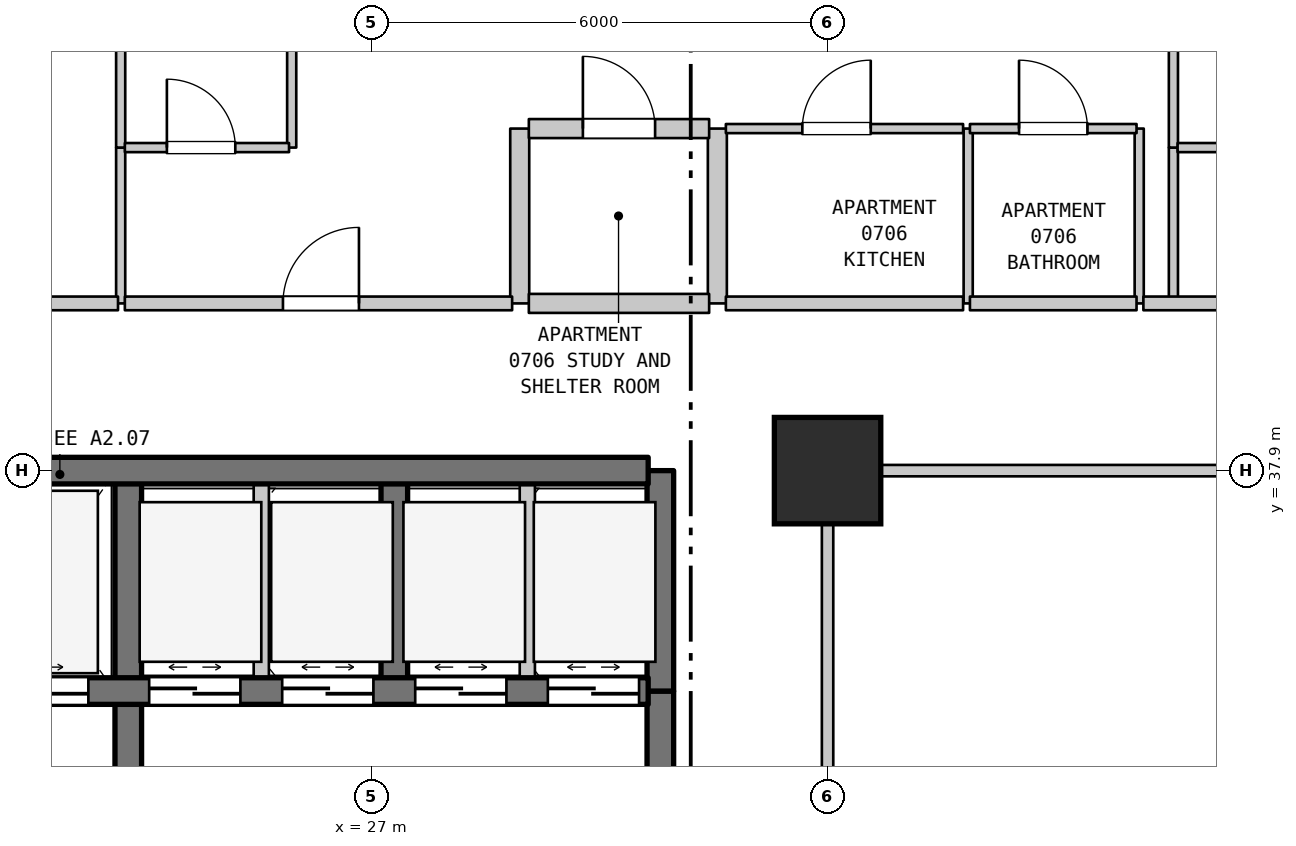
"""IFC4 building model, lengths in metres.
Left out: names, types, materials, properties, quantities, classifications, styles, units other than length and angle.
Written with IfcOpenShell. Run it as: python <this file> out.ifc"""

import sys

from ifc_helpers import new_model, si_unit, direction, frame, frame_2d, origin, origin_2d, place, context, subcontext, project, spatial, rectangle, extrude, element, fill, save


model = new_model("IFC4")
c1 = context("Model", 3, precision=1e-05, world=origin(), true_north=direction((0.0, 1.0)))
c2 = subcontext(c1, "Body", "Model", "MODEL_VIEW")
j1 = project(units=[si_unit("LENGTHUNIT", "METRE"), si_unit("PLANEANGLEUNIT", "RADIAN")], contexts=[c1])
p1 = place(None, origin())
s1 = spatial("IfcSite", under=j1, at=p1, CompositionType="ELEMENT")
p2 = place(p1, origin())
s2 = spatial("IfcBuilding", under=s1, at=p2, CompositionType="ELEMENT")
p3 = place(p2, frame((0.0, 0.0, 35.1)))
s3 = spatial("IfcBuildingStorey", under=s2, at=p3, CompositionType="ELEMENT", Elevation=35.1)
p4 = place(p3, frame((33.0, 37.9, 0.0), z_axis=(0.0, 0.0, 1.0), x_axis=(1.0, 0.0, 0.0)))
e1 = element("IfcColumn", 1, at=p4, inside=s3, PredefinedType="COLUMN", context=c2, shape_type="SweptSolid", body=[
    extrude(rectangle(XDim=1.4, YDim=1.4, at=origin_2d()), origin(), (0.0, 0.0, 1.0), 3.7),
])
p5 = place(p3, frame((23.7, 40.1, 0.0), z_axis=(0.0, 0.0, 1.0), x_axis=(0.0, 1.0, 0.0)))
e2 = element("IfcWall", 2, at=p5, inside=s3, PredefinedType="PARTITIONING", context=c2, shape_type="SweptSolid", body=[
    extrude(rectangle(XDim=2.05, YDim=0.12, at=frame_2d((1.025, 0.0))), origin(), (0.0, 0.0, 1.0), 3.385),
])
p6 = place(p3, frame((23.7, 42.15, 0.0), z_axis=(0.0, 0.0, 1.0), x_axis=(0.0, 1.0, 0.0)))
e3 = element("IfcWall", 3, at=p6, inside=s3, PredefinedType="PARTITIONING", context=c2, shape_type="SweptSolid", body=[
    extrude(rectangle(XDim=11.74, YDim=0.12, at=frame_2d((5.87, 0.0))), origin(), (0.0, 0.0, 1.0), 3.385),
])
p7 = place(p3, frame((23.8, 31.5, 0.0), z_axis=(0.0, 0.0, 1.0), x_axis=(0.0, 1.0, 0.0)))
e4 = element("IfcWall", 4, at=p7, inside=s3, PredefinedType="SHEAR", context=c2, shape_type="SweptSolid", body=[
    extrude(rectangle(XDim=3.5, YDim=0.35, at=frame_2d((1.75, 0.0))), origin(), (0.0, 0.0, 1.0), 3.385),
])
p8 = place(p7, frame((1.127, 0.0, 0.0)))
e5 = element("IfcOpeningElement", 5, at=p8, cuts=e4, PredefinedType="OPENING", context=c2, shape_type="SweptSolid", body=[
    extrude(rectangle(XDim=1.1, YDim=2.15, at=frame_2d((0.55, 1.075))), frame((0.0, 0.185, 0.0), z_axis=(0.0, -1.0, 0.0), x_axis=(1.0, 0.0, 0.0)), (0.0, 0.0, 1.0), 0.37),
])
p9 = place(p3, frame((23.8, 35.0, 0.0), z_axis=(0.0, 0.0, 1.0), x_axis=(0.0, 1.0, 0.0)))
e6 = element("IfcWall", 6, at=p9, inside=s3, PredefinedType="SHEAR", context=c2, shape_type="SweptSolid", body=[
    extrude(rectangle(XDim=2.9, YDim=0.35, at=frame_2d((1.45, 0.0))), origin(), (0.0, 0.0, 1.0), 3.385),
])
p10 = place(p3, frame((25.55, 35.0, 0.0), z_axis=(0.0, 0.0, 1.0), x_axis=(0.0, 1.0, 0.0)))
e7 = element("IfcWall", 7, at=p10, inside=s3, PredefinedType="STANDARD", context=c2, shape_type="SweptSolid", body=[
    extrude(rectangle(XDim=2.9, YDim=0.2, at=frame_2d((1.45, 0.0))), origin(), (0.0, 0.0, 1.0), 3.385),
])
p11 = place(p3, frame((25.95, 42.15, 0.0), z_axis=(0.0, 0.0, 1.0), x_axis=(0.0, 1.0, 0.0)))
e8 = element("IfcWall", 8, at=p11, inside=s3, PredefinedType="PARTITIONING", context=c2, shape_type="SweptSolid", body=[
    extrude(rectangle(XDim=11.74, YDim=0.12, at=frame_2d((5.87, 0.0))), origin(), (0.0, 0.0, 1.0), 3.385),
])
p12 = place(p3, frame((27.3, 35.0, 0.0), z_axis=(0.0, 0.0, 1.0), x_axis=(0.0, 1.0, 0.0)))
e9 = element("IfcWall", 9, at=p12, inside=s3, PredefinedType="SHEAR", context=c2, shape_type="SweptSolid", body=[
    extrude(rectangle(XDim=2.9, YDim=0.35, at=frame_2d((1.45, 0.0))), origin(), (0.0, 0.0, 1.0), 3.385),
])
p13 = place(p3, frame((28.95, 40.1, 0.0), z_axis=(0.0, 0.0, 1.0), x_axis=(0.0, 1.0, 0.0)))
e10 = element("IfcWall", 10, at=p13, inside=s3, PredefinedType="STANDARD", context=c2, shape_type="SweptSolid", body=[
    extrude(rectangle(XDim=2.3, YDim=0.25, at=frame_2d((1.15, 0.0))), origin(), (0.0, 0.0, 1.0), 3.385),
])
p14 = place(p3, frame((29.05, 35.0, 0.0), z_axis=(0.0, 0.0, 1.0), x_axis=(0.0, 1.0, 0.0)))
e11 = element("IfcWall", 11, at=p14, inside=s3, PredefinedType="STANDARD", context=c2, shape_type="SweptSolid", body=[
    extrude(rectangle(XDim=2.9, YDim=0.2, at=frame_2d((1.45, 0.0))), origin(), (0.0, 0.0, 1.0), 3.385),
])
p15 = place(p3, frame((30.8, 31.5, 0.0), z_axis=(0.0, 0.0, 1.0), x_axis=(0.0, 1.0, 0.0)))
e12 = element("IfcWall", 12, at=p15, inside=s3, PredefinedType="SHEAR", context=c2, shape_type="SweptSolid", body=[
    extrude(rectangle(XDim=3.5, YDim=0.35, at=frame_2d((1.75, 0.0))), origin(), (0.0, 0.0, 1.0), 3.385),
])
p16 = place(p15, frame((1.15, 0.0, 0.0)))
e13 = element("IfcOpeningElement", 13, at=p16, cuts=e12, PredefinedType="OPENING", context=c2, shape_type="SweptSolid", body=[
    extrude(rectangle(XDim=1.2, YDim=2.2, at=frame_2d((0.6, 1.1))), frame((0.0, 0.185, 0.0), z_axis=(0.0, -1.0, 0.0), x_axis=(1.0, 0.0, 0.0)), (0.0, 0.0, 1.0), 0.37),
])
p17 = place(p3, frame((30.8, 35.0, 0.0), z_axis=(0.0, 0.0, 1.0), x_axis=(0.0, 1.0, 0.0)))
e14 = element("IfcWall", 14, at=p17, inside=s3, PredefinedType="SHEAR", context=c2, shape_type="SweptSolid", body=[
    extrude(rectangle(XDim=2.9, YDim=0.35, at=frame_2d((1.45, 0.0))), origin(), (0.0, 0.0, 1.0), 3.385),
])
p18 = place(p3, frame((31.55, 40.1, 0.0), z_axis=(0.0, 0.0, 1.0), x_axis=(0.0, 1.0, 0.0)))
e15 = element("IfcWall", 15, at=p18, inside=s3, PredefinedType="STANDARD", context=c2, shape_type="SweptSolid", body=[
    extrude(rectangle(XDim=2.3, YDim=0.25, at=frame_2d((1.15, 0.0))), origin(), (0.0, 0.0, 1.0), 3.385),
])
p19 = place(p3, frame((33.0, 27.91, 0.0), z_axis=(0.0, 0.0, 1.0), x_axis=(0.0, 1.0, 0.0)))
e16 = element("IfcWall", 16, at=p19, inside=s3, PredefinedType="STANDARD", context=c2, shape_type="SweptSolid", body=[
    extrude(rectangle(XDim=9.98, YDim=0.15, at=frame_2d((4.99, 0.0))), origin(), (0.0, 0.0, 1.0), 2.885),
])
for number, where, z_axis, x_axis in (
    (17, (34.85, 40.1, 0.0), (0.0, 0.0, 1.0), (0.0, 1.0, 0.0)),
    (18, (37.1, 40.1, 0.0), (0.0, 0.0, 1.0), (0.0, 1.0, 0.0)),
):
    element("IfcWall", number, at=place(p3, frame(where, z_axis=z_axis, x_axis=x_axis)), inside=s3, PredefinedType="PARTITIONING", context=c2, shape_type="SweptSolid", body=[
        extrude(rectangle(XDim=2.3, YDim=0.12, at=frame_2d((1.15, 0.0))), origin(), (0.0, 0.0, 1.0), 3.385),
    ])
p20 = place(p3, frame((37.55, 40.1, 0.0), z_axis=(0.0, 0.0, 1.0), x_axis=(0.0, 1.0, 0.0)))
e19 = element("IfcWall", 19, at=p20, inside=s3, PredefinedType="PARTITIONING", context=c2, shape_type="SweptSolid", body=[
    extrude(rectangle(XDim=2.05, YDim=0.12, at=frame_2d((1.025, 0.0))), origin(), (0.0, 0.0, 1.0), 3.385),
])
p21 = place(p3, frame((37.55, 42.15, 0.0), z_axis=(0.0, 0.0, 1.0), x_axis=(0.0, 1.0, 0.0)))
e20 = element("IfcWall", 20, at=p21, inside=s3, PredefinedType="PARTITIONING", context=c2, shape_type="SweptSolid", body=[
    extrude(rectangle(XDim=3.3, YDim=0.12, at=frame_2d((1.65, 0.0))), origin(), (0.0, 0.0, 1.0), 3.385),
])
p22 = place(p3, frame((19.16, 35.0, 0.0), z_axis=(0.0, 0.0, 1.0), x_axis=(1.0, 0.0, 0.0)))
e21 = element("IfcWall", 21, at=p22, inside=s3, PredefinedType="SHEAR", context=c2, shape_type="SweptSolid", body=[
    extrude(rectangle(XDim=11.48, YDim=0.35, at=frame_2d((5.74, 0.0))), origin(), (0.0, 0.0, 1.0), 3.385),
])
p23 = place(p22, frame((0.365, 0.0, 0.0)))
e22 = element("IfcOpeningElement", 22, at=p23, cuts=e21, PredefinedType="OPENING", context=c2, shape_type="SweptSolid", body=[
    extrude(rectangle(XDim=1.35, YDim=2.2, at=frame_2d((0.675, 1.1))), frame((0.0, 0.185, 0.0), z_axis=(0.0, -1.0, 0.0), x_axis=(1.0, 0.0, 0.0)), (0.0, 0.0, 1.0), 0.37),
])
p24 = place(p22, frame((2.765, 0.0, 0.0)))
e23 = element("IfcOpeningElement", 23, at=p24, cuts=e21, PredefinedType="OPENING", context=c2, shape_type="SweptSolid", body=[
    extrude(rectangle(XDim=1.35, YDim=2.2, at=frame_2d((0.675, 1.1))), frame((0.0, 0.185, 0.0), z_axis=(0.0, -1.0, 0.0), x_axis=(1.0, 0.0, 0.0)), (0.0, 0.0, 1.0), 0.37),
])
p25 = place(p22, frame((4.915, 0.0, 0.0)))
e24 = element("IfcOpeningElement", 24, at=p25, cuts=e21, PredefinedType="OPENING", context=c2, shape_type="SweptSolid", body=[
    extrude(rectangle(XDim=1.2, YDim=2.2, at=frame_2d((0.6, 1.1))), frame((0.0, 0.185, 0.0), z_axis=(0.0, -1.0, 0.0), x_axis=(1.0, 0.0, 0.0)), (0.0, 0.0, 1.0), 0.37),
])
p26 = place(p22, frame((6.665, 0.0, 0.0)))
e25 = element("IfcOpeningElement", 25, at=p26, cuts=e21, PredefinedType="OPENING", context=c2, shape_type="SweptSolid", body=[
    extrude(rectangle(XDim=1.2, YDim=2.2, at=frame_2d((0.6, 1.1))), frame((0.0, 0.185, 0.0), z_axis=(0.0, -1.0, 0.0), x_axis=(1.0, 0.0, 0.0)), (0.0, 0.0, 1.0), 0.37),
])
p27 = place(p22, frame((8.415, 0.0, 0.0)))
e26 = element("IfcOpeningElement", 26, at=p27, cuts=e21, PredefinedType="OPENING", context=c2, shape_type="SweptSolid", body=[
    extrude(rectangle(XDim=1.2, YDim=2.2, at=frame_2d((0.6, 1.1))), frame((0.0, 0.185, 0.0), z_axis=(0.0, -1.0, 0.0), x_axis=(1.0, 0.0, 0.0)), (0.0, 0.0, 1.0), 0.37),
])
p28 = place(p22, frame((10.16, 0.0, 0.0)))
e27 = element("IfcOpeningElement", 27, at=p28, cuts=e21, PredefinedType="OPENING", context=c2, shape_type="SweptSolid", body=[
    extrude(rectangle(XDim=1.2, YDim=2.2, at=frame_2d((0.6, 1.1))), frame((0.0, 0.185, 0.0), z_axis=(0.0, -1.0, 0.0), x_axis=(1.0, 0.0, 0.0)), (0.0, 0.0, 1.0), 0.37),
])
p29 = place(p3, frame((19.16, 37.9, 0.0), z_axis=(0.0, 0.0, 1.0), x_axis=(1.0, 0.0, 0.0)))
e28 = element("IfcWall", 28, at=p29, inside=s3, PredefinedType="SHEAR", context=c2, shape_type="SweptSolid", body=[
    extrude(rectangle(XDim=11.48, YDim=0.35, at=frame_2d((5.74, 0.0))), origin(), (0.0, 0.0, 1.0), 3.385),
])
p30 = place(p3, frame((33.07, 37.9, 0.0), z_axis=(0.0, 0.0, 1.0), x_axis=(1.0, 0.0, 0.0)))
e29 = element("IfcWall", 29, at=p30, inside=s3, PredefinedType="STANDARD", context=c2, shape_type="SweptSolid", body=[
    extrude(rectangle(XDim=26.935, YDim=0.15, at=frame_2d((13.467, 0.0))), origin(), (0.0, 0.0, 1.0), 3.385),
])
p31 = place(p3, frame((21.255, 40.1, 0.0), z_axis=(0.0, 0.0, 1.0), x_axis=(1.0, 0.0, 0.0)))
e30 = element("IfcWall", 30, at=p31, inside=s3, PredefinedType="STANDARD", context=c2, shape_type="SweptSolid", body=[
    extrude(rectangle(XDim=2.41, YDim=0.18, at=frame_2d((1.205, 0.0))), origin(), (0.0, 0.0, 1.0), 3.385),
])
p32 = place(p3, frame((23.755, 40.1, 0.0), z_axis=(0.0, 0.0, 1.0), x_axis=(1.0, 0.0, 0.0)))
e31 = element("IfcWall", 31, at=p32, inside=s3, PredefinedType="STANDARD", context=c2, shape_type="SweptSolid", body=[
    extrude(rectangle(XDim=5.095, YDim=0.18, at=frame_2d((2.548, 0.0))), origin(), (0.0, 0.0, 1.0), 3.385),
])
p33 = place(p32, frame((2.08, 0.0, 0.0)))
e32 = element("IfcOpeningElement", 32, at=p33, cuts=e31, PredefinedType="OPENING", context=c2, shape_type="SweptSolid", body=[
    extrude(rectangle(XDim=1.0, YDim=2.15, at=frame_2d((0.5, 1.075))), frame((0.0, 0.1, 0.0), z_axis=(0.0, -1.0, 0.0), x_axis=(1.0, 0.0, 0.0)), (0.0, 0.0, 1.0), 0.2),
])
p34 = place(p3, frame((29.07, 40.1, 0.0), z_axis=(0.0, 0.0, 1.0), x_axis=(1.0, 0.0, 0.0)))
e33 = element("IfcWall", 33, at=p34, inside=s3, PredefinedType="STANDARD", context=c2, shape_type="SweptSolid", body=[
    extrude(rectangle(XDim=2.372, YDim=0.25, at=frame_2d((1.186, 0.0))), origin(), (0.0, 0.0, 1.0), 3.385),
])
p35 = place(p3, frame((31.662, 40.1, 0.0), z_axis=(0.0, 0.0, 1.0), x_axis=(1.0, 0.0, 0.0)))
e34 = element("IfcWall", 34, at=p35, inside=s3, PredefinedType="STANDARD", context=c2, shape_type="SweptSolid", body=[
    extrude(rectangle(XDim=3.121, YDim=0.18, at=frame_2d((1.561, 0.0))), origin(), (0.0, 0.0, 1.0), 3.385),
])
p36 = place(p3, frame((34.873, 40.1, 0.0), z_axis=(0.0, 0.0, 1.0), x_axis=(1.0, 0.0, 0.0)))
e35 = element("IfcWall", 35, at=p36, inside=s3, PredefinedType="STANDARD", context=c2, shape_type="SweptSolid", body=[
    extrude(rectangle(XDim=2.192, YDim=0.18, at=frame_2d((1.096, 0.0))), origin(), (0.0, 0.0, 1.0), 3.385),
])
p37 = place(p3, frame((37.155, 40.1, 0.0), z_axis=(0.0, 0.0, 1.0), x_axis=(1.0, 0.0, 0.0)))
e36 = element("IfcWall", 36, at=p37, inside=s3, PredefinedType="STANDARD", context=c2, shape_type="SweptSolid", body=[
    extrude(rectangle(XDim=5.3, YDim=0.18, at=frame_2d((2.65, 0.0))), origin(), (0.0, 0.0, 1.0), 3.385),
])
p38 = place(p37, frame((2.15, 0.0, 0.0)))
e37 = element("IfcOpeningElement", 37, at=p38, cuts=e36, PredefinedType="OPENING", context=c2, shape_type="SweptSolid", body=[
    extrude(rectangle(XDim=1.0, YDim=2.15, at=frame_2d((0.5, 1.075))), frame((0.0, 0.1, 0.0), z_axis=(0.0, -1.0, 0.0), x_axis=(1.0, 0.0, 0.0)), (0.0, 0.0, 1.0), 0.2),
])
p39 = place(p3, frame((23.755, 42.15, 0.0), z_axis=(0.0, 0.0, 1.0), x_axis=(1.0, 0.0, 0.0)))
e38 = element("IfcWall", 38, at=p39, inside=s3, PredefinedType="PARTITIONING", context=c2, shape_type="SweptSolid", body=[
    extrude(rectangle(XDim=2.16, YDim=0.12, at=frame_2d((1.08, 0.0))), origin(), (0.0, 0.0, 1.0), 3.385),
])
p40 = place(p39, frame((0.553, 0.0, 0.0)))
e39 = element("IfcOpeningElement", 39, at=p40, cuts=e38, PredefinedType="OPENING", context=c2, shape_type="SweptSolid", body=[
    extrude(rectangle(XDim=0.9, YDim=2.15, at=frame_2d((0.45, 1.075))), frame((0.0, 0.07, 0.0), z_axis=(0.0, -1.0, 0.0), x_axis=(1.0, 0.0, 0.0)), (0.0, 0.0, 1.0), 0.14),
])
p41 = place(p3, frame((37.605, 42.15, 0.0), z_axis=(0.0, 0.0, 1.0), x_axis=(1.0, 0.0, 0.0)))
e40 = element("IfcWall", 40, at=p41, inside=s3, PredefinedType="PARTITIONING", context=c2, shape_type="SweptSolid", body=[
    extrude(rectangle(XDim=2.16, YDim=0.12, at=frame_2d((1.08, 0.0))), origin(), (0.0, 0.0, 1.0), 3.385),
])
p42 = place(p41, frame((0.553, 0.0, 0.0)))
e41 = element("IfcOpeningElement", 41, at=p42, cuts=e40, PredefinedType="OPENING", context=c2, shape_type="SweptSolid", body=[
    extrude(rectangle(XDim=0.9, YDim=2.15, at=frame_2d((0.45, 1.075))), frame((0.0, 0.07, 0.0), z_axis=(0.0, -1.0, 0.0), x_axis=(1.0, 0.0, 0.0)), (0.0, 0.0, 1.0), 0.14),
])
p43 = place(p3, frame((29.07, 42.4, 0.0), z_axis=(0.0, 0.0, 1.0), x_axis=(1.0, 0.0, 0.0)))
e42 = element("IfcWall", 42, at=p43, inside=s3, PredefinedType="STANDARD", context=c2, shape_type="SweptSolid", body=[
    extrude(rectangle(XDim=2.372, YDim=0.25, at=frame_2d((1.186, 0.0))), origin(), (0.0, 0.0, 1.0), 3.385),
])
p44 = place(p43, frame((0.711, 0.0, 0.0)))
e43 = element("IfcOpeningElement", 43, at=p44, cuts=e42, PredefinedType="OPENING", context=c2, shape_type="SweptSolid", body=[
    extrude(rectangle(XDim=0.95, YDim=2.15, at=frame_2d((0.475, 1.075))), frame((0.0, 0.135, 0.0), z_axis=(0.0, -1.0, 0.0), x_axis=(1.0, 0.0, 0.0)), (0.0, 0.0, 1.0), 0.27),
])
p45 = place(p3, frame((31.662, 42.4, 0.0), z_axis=(0.0, 0.0, 1.0), x_axis=(1.0, 0.0, 0.0)))
e44 = element("IfcWall", 44, at=p45, inside=s3, PredefinedType="PARTITIONING", context=c2, shape_type="SweptSolid", body=[
    extrude(rectangle(XDim=3.121, YDim=0.12, at=frame_2d((1.561, 0.0))), origin(), (0.0, 0.0, 1.0), 3.385),
])
p46 = place(p45, frame((1.006, 0.0, 0.0)))
e45 = element("IfcOpeningElement", 45, at=p46, cuts=e44, PredefinedType="OPENING", context=c2, shape_type="SweptSolid", body=[
    extrude(rectangle(XDim=0.9, YDim=2.15, at=frame_2d((0.45, 1.075))), frame((0.0, 0.07, 0.0), z_axis=(0.0, -1.0, 0.0), x_axis=(1.0, 0.0, 0.0)), (0.0, 0.0, 1.0), 0.14),
])
p47 = place(p3, frame((34.873, 42.4, 0.0), z_axis=(0.0, 0.0, 1.0), x_axis=(1.0, 0.0, 0.0)))
e46 = element("IfcWall", 46, at=p47, inside=s3, PredefinedType="PARTITIONING", context=c2, shape_type="SweptSolid", body=[
    extrude(rectangle(XDim=2.192, YDim=0.12, at=frame_2d((1.096, 0.0))), origin(), (0.0, 0.0, 1.0), 3.385),
])
p48 = place(p47, frame((0.646, 0.0, 0.0)))
e47 = element("IfcOpeningElement", 47, at=p48, cuts=e46, PredefinedType="OPENING", context=c2, shape_type="SweptSolid", body=[
    extrude(rectangle(XDim=0.9, YDim=2.1, at=frame_2d((0.45, 1.05))), frame((0.0, 0.07, 0.0), z_axis=(0.0, -1.0, 0.0), x_axis=(1.0, 0.0, 0.0)), (0.0, 0.0, 1.0), 0.14),
])
p49 = place(p24, origin())
e48 = element("IfcDoor", 48, at=p49, inside=s3, OperationType="DOUBLE_DOOR_SLIDING", PredefinedType="DOOR", context=c2, shape_type="SweptSolid", body=[
    extrude(rectangle(XDim=1.35, YDim=2.2, at=frame_2d((0.675, 1.1))), frame((0.0, 0.025, 0.0), z_axis=(0.0, -1.0, 0.0), x_axis=(1.0, 0.0, 0.0)), (0.0, 0.0, 1.0), 0.05),
])
fill(e23, e48)
p50 = place(p25, origin())
e49 = element("IfcDoor", 49, at=p50, inside=s3, OperationType="DOUBLE_DOOR_SLIDING", PredefinedType="DOOR", context=c2, shape_type="SweptSolid", body=[
    extrude(rectangle(XDim=1.2, YDim=2.2, at=frame_2d((0.6, 1.1))), frame((0.0, 0.025, 0.0), z_axis=(0.0, -1.0, 0.0), x_axis=(1.0, 0.0, 0.0)), (0.0, 0.0, 1.0), 0.05),
])
fill(e24, e49)
p51 = place(p26, origin())
e50 = element("IfcDoor", 50, at=p51, inside=s3, OperationType="DOUBLE_DOOR_SLIDING", PredefinedType="DOOR", context=c2, shape_type="SweptSolid", body=[
    extrude(rectangle(XDim=1.2, YDim=2.2, at=frame_2d((0.6, 1.1))), frame((0.0, 0.025, 0.0), z_axis=(0.0, -1.0, 0.0), x_axis=(1.0, 0.0, 0.0)), (0.0, 0.0, 1.0), 0.05),
])
fill(e25, e50)
p52 = place(p27, origin())
e51 = element("IfcDoor", 51, at=p52, inside=s3, OperationType="DOUBLE_DOOR_SLIDING", PredefinedType="DOOR", context=c2, shape_type="SweptSolid", body=[
    extrude(rectangle(XDim=1.2, YDim=2.2, at=frame_2d((0.6, 1.1))), frame((0.0, 0.025, 0.0), z_axis=(0.0, -1.0, 0.0), x_axis=(1.0, 0.0, 0.0)), (0.0, 0.0, 1.0), 0.05),
])
fill(e26, e51)
p53 = place(p28, origin())
e52 = element("IfcDoor", 52, at=p53, inside=s3, OperationType="DOUBLE_DOOR_SLIDING", PredefinedType="DOOR", context=c2, shape_type="SweptSolid", body=[
    extrude(rectangle(XDim=1.2, YDim=2.2, at=frame_2d((0.6, 1.1))), frame((0.0, 0.025, 0.0), z_axis=(0.0, -1.0, 0.0), x_axis=(1.0, 0.0, 0.0)), (0.0, 0.0, 1.0), 0.05),
])
fill(e27, e52)
p54 = place(p33, origin())
e53 = element("IfcDoor", 53, at=p54, inside=s3, OperationType="SINGLE_SWING_RIGHT", PredefinedType="DOOR", context=c2, shape_type="SweptSolid", body=[
    extrude(rectangle(XDim=1.0, YDim=2.15, at=frame_2d((0.5, 1.075))), frame((0.0, 0.025, 0.0), z_axis=(0.0, -1.0, 0.0), x_axis=(1.0, 0.0, 0.0)), (0.0, 0.0, 1.0), 0.05),
])
fill(e32, e53)
p55 = place(p40, origin())
e54 = element("IfcDoor", 54, at=p55, inside=s3, OperationType="SINGLE_SWING_LEFT", PredefinedType="DOOR", context=c2, shape_type="SweptSolid", body=[
    extrude(rectangle(XDim=0.9, YDim=2.15, at=frame_2d((0.45, 1.075))), frame((0.0, 0.025, 0.0), z_axis=(0.0, -1.0, 0.0), x_axis=(1.0, 0.0, 0.0)), (0.0, 0.0, 1.0), 0.05),
])
fill(e39, e54)
p56 = place(p44, origin())
e55 = element("IfcDoor", 55, at=p56, inside=s3, OperationType="SINGLE_SWING_LEFT", PredefinedType="DOOR", context=c2, shape_type="SweptSolid", body=[
    extrude(rectangle(XDim=0.95, YDim=2.15, at=frame_2d((0.475, 1.075))), frame((0.0, 0.025, 0.0), z_axis=(0.0, -1.0, 0.0), x_axis=(1.0, 0.0, 0.0)), (0.0, 0.0, 1.0), 0.05),
])
fill(e43, e55)
p57 = place(p46, origin())
e56 = element("IfcDoor", 56, at=p57, inside=s3, OperationType="SINGLE_SWING_RIGHT", PredefinedType="DOOR", context=c2, shape_type="SweptSolid", body=[
    extrude(rectangle(XDim=0.9, YDim=2.15, at=frame_2d((0.45, 1.075))), frame((0.0, 0.025, 0.0), z_axis=(0.0, -1.0, 0.0), x_axis=(1.0, 0.0, 0.0)), (0.0, 0.0, 1.0), 0.05),
])
fill(e45, e56)
p58 = place(p48, origin())
e57 = element("IfcDoor", 57, at=p58, inside=s3, OperationType="SINGLE_SWING_LEFT", PredefinedType="DOOR", context=c2, shape_type="SweptSolid", body=[
    extrude(rectangle(XDim=0.9, YDim=2.1, at=frame_2d((0.45, 1.05))), frame((0.0, 0.025, 0.0), z_axis=(0.0, -1.0, 0.0), x_axis=(1.0, 0.0, 0.0)), (0.0, 0.0, 1.0), 0.05),
])
fill(e47, e57)
save(model, sys.argv[1])
